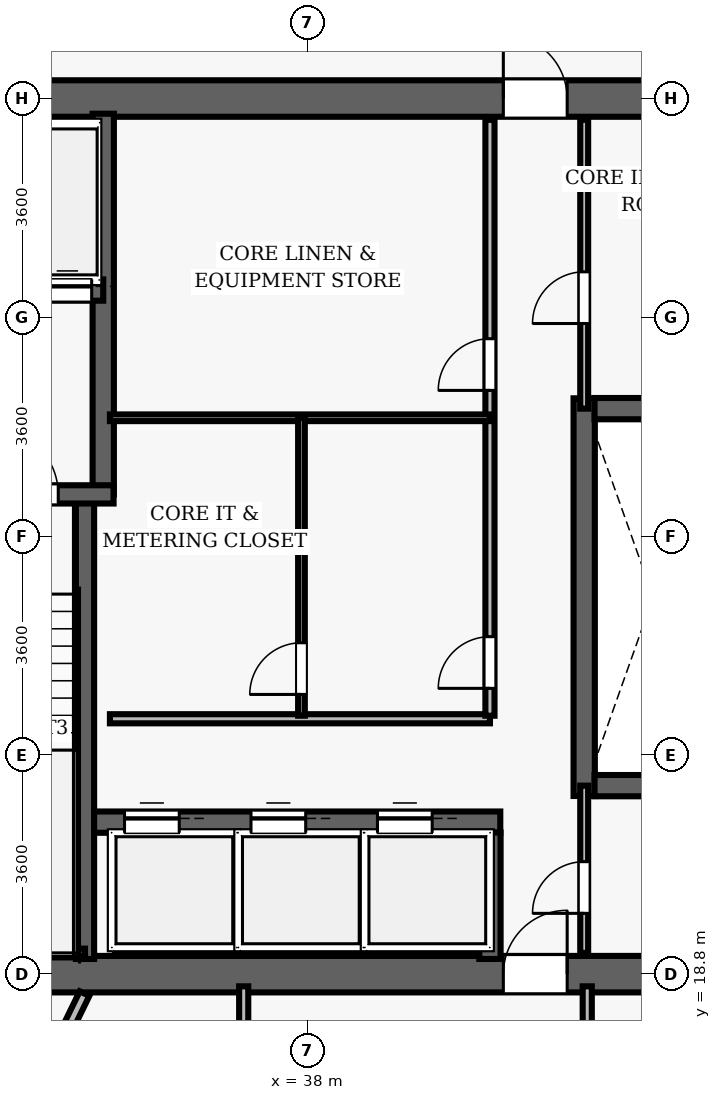
"""IFC4 building model, lengths in metres.
Left out: names, types, materials, properties, quantities, classifications, styles, units other than length and angle.
Written with IfcOpenShell. Run it as: python <this file> out.ifc"""

import sys

from ifc_helpers import new_model, si_unit, direction, frame, frame_2d, origin, place, context, subcontext, project, spatial, rectangle, extrude, element, fill, save


model = new_model("IFC4")
c1 = context("Model", 3, precision=1e-05, world=origin(), true_north=direction((0.0, 1.0)))
c2 = subcontext(c1, "Body", "Model", "MODEL_VIEW")
j1 = project(units=[si_unit("LENGTHUNIT", "METRE"), si_unit("PLANEANGLEUNIT", "RADIAN")], contexts=[c1])
p1 = place(None, origin())
s1 = spatial("IfcSite", under=j1, at=p1, CompositionType="ELEMENT")
p2 = place(p1, origin())
s2 = spatial("IfcBuilding", under=s1, at=p2, CompositionType="ELEMENT")
p3 = place(p2, frame((0.0, 0.0, 148.3)))
s3 = spatial("IfcBuildingStorey", under=s2, at=p3, CompositionType="ELEMENT", Elevation=148.3)
p4 = place(p3, frame((26.7, 18.8, 0.0), z_axis=(0.0, 0.0, 1.0), x_axis=(1.0, 0.0, 0.0)))
e1 = element("IfcWall", 1, at=p4, inside=s3, PredefinedType="SHEAR", context=c2, shape_type="SweptSolid", body=[
    extrude(rectangle(XDim=22.6, YDim=0.6, at=frame_2d((11.3, 0.0))), origin(), (0.0, 0.0, 1.0), 3.5),
])
p5 = place(p4, frame((14.52, 0.0, 0.0)))
e2 = element("IfcOpeningElement", 2, at=p5, cuts=e1, PredefinedType="OPENING", context=c2, shape_type="SweptSolid", body=[
    extrude(rectangle(XDim=1.05, YDim=2.15, at=frame_2d((0.525, 1.075))), frame((0.0, 0.31, 0.0), z_axis=(0.0, -1.0, 0.0), x_axis=(1.0, 0.0, 0.0)), (0.0, 0.0, 1.0), 0.62),
])
p6 = place(p3, frame((26.7, 33.2, 0.0), z_axis=(0.0, 0.0, 1.0), x_axis=(1.0, 0.0, 0.0)))
e3 = element("IfcWall", 3, at=p6, inside=s3, PredefinedType="SHEAR", context=c2, shape_type="SweptSolid", body=[
    extrude(rectangle(XDim=22.6, YDim=0.6, at=frame_2d((11.3, 0.0))), origin(), (0.0, 0.0, 1.0), 3.5),
])
p7 = place(p6, frame((4.62, 0.0, 0.0)))
e4 = element("IfcOpeningElement", 4, at=p7, cuts=e3, PredefinedType="OPENING", context=c2, shape_type="SweptSolid", body=[
    extrude(rectangle(XDim=1.05, YDim=2.15, at=frame_2d((0.525, 1.075))), frame((0.0, 0.31, 0.0), z_axis=(0.0, -1.0, 0.0), x_axis=(1.0, 0.0, 0.0)), (0.0, 0.0, 1.0), 0.62),
])
p8 = place(p6, frame((14.52, 0.0, 0.0)))
e5 = element("IfcOpeningElement", 5, at=p8, cuts=e3, PredefinedType="OPENING", context=c2, shape_type="SweptSolid", body=[
    extrude(rectangle(XDim=1.05, YDim=2.15, at=frame_2d((0.525, 1.075))), frame((0.0, 0.31, 0.0), z_axis=(0.0, -1.0, 0.0), x_axis=(1.0, 0.0, 0.0)), (0.0, 0.0, 1.0), 0.62),
])
p9 = place(p3, frame((34.34, 19.05, 0.0), z_axis=(0.0, 0.0, 1.0), x_axis=(0.0, 1.0, 0.0)))
e6 = element("IfcWall", 6, at=p9, inside=s3, PredefinedType="SHEAR", context=c2, shape_type="SweptSolid", body=[
    extrude(rectangle(XDim=7.5, YDim=0.3, at=frame_2d((3.75, 0.0))), origin(), (0.0, 0.0, 1.0), 3.5),
])
p10 = place(p3, frame((34.64, 26.69, 0.0), z_axis=(0.0, 0.0, 1.0), x_axis=(0.0, 1.0, 0.0)))
e7 = element("IfcWall", 7, at=p10, inside=s3, PredefinedType="SHEAR", context=c2, shape_type="SweptSolid", body=[
    extrude(rectangle(XDim=6.26, YDim=0.35, at=frame_2d((3.13, 0.0))), origin(), (0.0, 0.0, 1.0), 3.5),
])
p11 = place(p3, frame((31.25, 26.69, 0.0), z_axis=(0.0, 0.0, 1.0), x_axis=(1.0, 0.0, 0.0)))
e8 = element("IfcWall", 8, at=p11, inside=s3, PredefinedType="SHEAR", context=c2, shape_type="SweptSolid", body=[
    extrude(rectangle(XDim=3.56, YDim=0.3, at=frame_2d((1.78, 0.0))), origin(), (0.0, 0.0, 1.0), 3.5),
])
p12 = place(p11, frame((1.55, 0.0, 0.0)))
e9 = element("IfcOpeningElement", 9, at=p12, cuts=e8, PredefinedType="OPENING", context=c2, shape_type="SweptSolid", body=[
    extrude(rectangle(XDim=1.1, YDim=2.15, at=frame_2d((0.55, 1.075))), frame((0.0, 0.16, 0.0), z_axis=(0.0, -1.0, 0.0), x_axis=(1.0, 0.0, 0.0)), (0.0, 0.0, 1.0), 0.32),
])
p13 = place(p3, frame((31.3, 19.16, 0.0), z_axis=(0.0, 0.0, 1.0), x_axis=(1.0, 0.0, 0.0)))
e10 = element("IfcWall", 10, at=p13, inside=s3, PredefinedType="SHEAR", context=c2, shape_type="SweptSolid", body=[
    extrude(rectangle(XDim=3.04, YDim=0.12, at=frame_2d((1.52, 0.0))), origin(), (0.0, 0.0, 1.0), 3.5),
])
p14 = place(p3, frame((32.23, 30.05, 0.0), z_axis=(0.0, 0.0, 1.0), x_axis=(1.0, 0.0, 0.0)))
e11 = element("IfcWall", 11, at=p14, inside=s3, PredefinedType="SHEAR", context=c2, shape_type="SweptSolid", body=[
    extrude(rectangle(XDim=2.41, YDim=0.35, at=frame_2d((1.205, 0.0))), origin(), (0.0, 0.0, 1.0), 2.675),
])
p15 = place(p14, frame((0.42, 0.0, 0.0)))
e12 = element("IfcOpeningElement", 12, at=p15, cuts=e11, PredefinedType="OPENING", context=c2, shape_type="SweptSolid", body=[
    extrude(rectangle(XDim=0.8, YDim=2.15, at=frame_2d((0.4, 1.075))), frame((0.0, 0.185, 0.0), z_axis=(0.0, -1.0, 0.0), x_axis=(1.0, 0.0, 0.0)), (0.0, 0.0, 1.0), 0.37),
])
p16 = place(p14, frame((1.42, 0.0, 0.0)))
e13 = element("IfcOpeningElement", 13, at=p16, cuts=e11, PredefinedType="OPENING", context=c2, shape_type="SweptSolid", body=[
    extrude(rectangle(XDim=0.8, YDim=2.15, at=frame_2d((0.4, 1.075))), frame((0.0, 0.185, 0.0), z_axis=(0.0, -1.0, 0.0), x_axis=(1.0, 0.0, 0.0)), (0.0, 0.0, 1.0), 0.37),
])
p17 = place(p3, frame((42.55, 21.73, 0.0), z_axis=(0.0, 0.0, 1.0), x_axis=(0.0, 1.0, 0.0)))
e14 = element("IfcWall", 14, at=p17, inside=s3, PredefinedType="SHEAR", context=c2, shape_type="SweptSolid", body=[
    extrude(rectangle(XDim=6.54, YDim=0.35, at=frame_2d((3.27, 0.0))), origin(), (0.0, 0.0, 1.0), 2.675),
])
for number, where, z_axis, x_axis in (
    (15, (42.72, 21.9, 0.0), (0.0, 0.0, 1.0), (1.0, 0.0, 0.0)),
    (16, (42.72, 28.1, 0.0), (0.0, 0.0, 1.0), (1.0, 0.0, 0.0)),
):
    element("IfcWall", number, at=place(p3, frame(where, z_axis=z_axis, x_axis=x_axis)), inside=s3, PredefinedType="SHEAR", context=c2, shape_type="SweptSolid", body=[
        extrude(rectangle(XDim=2.03, YDim=0.35, at=frame_2d((1.015, 0.0))), origin(), (0.0, 0.0, 1.0), 2.675),
    ])
p18 = place(p3, frame((34.49, 21.3, 0.0), z_axis=(0.0, 0.0, 1.0), x_axis=(1.0, 0.0, 0.0)))
e17 = element("IfcWall", 17, at=p18, inside=s3, PredefinedType="SHEAR", context=c2, shape_type="SweptSolid", body=[
    extrude(rectangle(XDim=6.68, YDim=0.35, at=frame_2d((3.34, 0.0))), origin(), (0.0, 0.0, 1.0), 2.675),
])
p19 = place(p18, frame((0.5, 0.0, 0.0)))
e18 = element("IfcOpeningElement", 18, at=p19, cuts=e17, PredefinedType="OPENING", context=c2, shape_type="SweptSolid", body=[
    extrude(rectangle(XDim=0.9, YDim=2.15, at=frame_2d((0.45, 1.075))), frame((0.0, 0.185, 0.0), z_axis=(0.0, -1.0, 0.0), x_axis=(1.0, 0.0, 0.0)), (0.0, 0.0, 1.0), 0.37),
])
p20 = place(p18, frame((2.58, 0.0, 0.0)))
e19 = element("IfcOpeningElement", 19, at=p20, cuts=e17, PredefinedType="OPENING", context=c2, shape_type="SweptSolid", body=[
    extrude(rectangle(XDim=0.9, YDim=2.15, at=frame_2d((0.45, 1.075))), frame((0.0, 0.185, 0.0), z_axis=(0.0, -1.0, 0.0), x_axis=(1.0, 0.0, 0.0)), (0.0, 0.0, 1.0), 0.37),
])
p21 = place(p18, frame((4.66, 0.0, 0.0)))
e20 = element("IfcOpeningElement", 20, at=p21, cuts=e17, PredefinedType="OPENING", context=c2, shape_type="SweptSolid", body=[
    extrude(rectangle(XDim=0.9, YDim=2.15, at=frame_2d((0.45, 1.075))), frame((0.0, 0.185, 0.0), z_axis=(0.0, -1.0, 0.0), x_axis=(1.0, 0.0, 0.0)), (0.0, 0.0, 1.0), 0.37),
])
p22 = place(p3, frame((41.0, 19.05, 0.0), z_axis=(0.0, 0.0, 1.0), x_axis=(0.0, 1.0, 0.0)))
e21 = element("IfcWall", 21, at=p22, inside=s3, PredefinedType="SHEAR", context=c2, shape_type="SweptSolid", body=[
    extrude(rectangle(XDim=2.08, YDim=0.35, at=frame_2d((1.04, 0.0))), origin(), (0.0, 0.0, 1.0), 2.675),
])
p23 = place(p3, frame((34.75, 23.0, 0.0), z_axis=(0.0, 0.0, 1.0), x_axis=(1.0, 0.0, 0.0)))
e22 = element("IfcWall", 22, at=p23, inside=s3, PredefinedType="PARTITIONING", context=c2, shape_type="SweptSolid", body=[
    extrude(rectangle(XDim=6.25, YDim=0.15, at=frame_2d((3.125, 0.0))), origin(), (0.0, 0.0, 1.0), 2.675),
])
p24 = place(p3, frame((41.0, 23.05, 0.0), z_axis=(0.0, 0.0, 1.0), x_axis=(0.0, 1.0, 0.0)))
e23 = element("IfcWall", 23, at=p24, inside=s3, PredefinedType="PARTITIONING", context=c2, shape_type="SweptSolid", body=[
    extrude(rectangle(XDim=9.8, YDim=0.15, at=frame_2d((4.9, 0.0))), origin(), (0.0, 0.0, 1.0), 2.675),
])
p25 = place(p24, frame((5.35, 0.0, 0.0)))
e24 = element("IfcOpeningElement", 24, at=p25, cuts=e23, PredefinedType="OPENING", context=c2, shape_type="SweptSolid", body=[
    extrude(rectangle(XDim=0.85, YDim=2.1, at=frame_2d((0.425, 1.05))), frame((0.0, 0.085, 0.0), z_axis=(0.0, -1.0, 0.0), x_axis=(1.0, 0.0, 0.0)), (0.0, 0.0, 1.0), 0.17),
])
p26 = place(p24, frame((0.45, 0.0, 0.0)))
e25 = element("IfcOpeningElement", 25, at=p26, cuts=e23, PredefinedType="OPENING", context=c2, shape_type="SweptSolid", body=[
    extrude(rectangle(XDim=0.85, YDim=2.1, at=frame_2d((0.425, 1.05))), frame((0.0, 0.085, 0.0), z_axis=(0.0, -1.0, 0.0), x_axis=(1.0, 0.0, 0.0)), (0.0, 0.0, 1.0), 0.17),
])
p27 = place(p3, frame((34.75, 27.95, 0.0), z_axis=(0.0, 0.0, 1.0), x_axis=(1.0, 0.0, 0.0)))
e26 = element("IfcWall", 26, at=p27, inside=s3, PredefinedType="PARTITIONING", context=c2, shape_type="SweptSolid", body=[
    extrude(rectangle(XDim=6.25, YDim=0.11, at=frame_2d((3.125, 0.0))), origin(), (0.0, 0.0, 1.0), 2.675),
])
p28 = place(p3, frame((37.9, 23.05, 0.0), z_axis=(0.0, 0.0, 1.0), x_axis=(0.0, 1.0, 0.0)))
e27 = element("IfcWall", 27, at=p28, inside=s3, PredefinedType="PARTITIONING", context=c2, shape_type="SweptSolid", body=[
    extrude(rectangle(XDim=4.9, YDim=0.11, at=frame_2d((2.45, 0.0))), origin(), (0.0, 0.0, 1.0), 2.675),
])
p29 = place(p28, frame((0.35, 0.0, 0.0)))
e28 = element("IfcOpeningElement", 28, at=p29, cuts=e27, PredefinedType="OPENING", context=c2, shape_type="SweptSolid", body=[
    extrude(rectangle(XDim=0.85, YDim=2.1, at=frame_2d((0.425, 1.05))), frame((0.0, 0.065, 0.0), z_axis=(0.0, -1.0, 0.0), x_axis=(1.0, 0.0, 0.0)), (0.0, 0.0, 1.0), 0.13),
])
p30 = place(p3, frame((42.55, 28.1, 0.0), z_axis=(0.0, 0.0, 1.0), x_axis=(0.0, 1.0, 0.0)))
e29 = element("IfcWall", 29, at=p30, inside=s3, PredefinedType="PARTITIONING", context=c2, shape_type="SweptSolid", body=[
    extrude(rectangle(XDim=4.75, YDim=0.13, at=frame_2d((2.375, 0.0))), origin(), (0.0, 0.0, 1.0), 2.675),
])
p31 = place(p30, frame((1.4, 0.0, 0.0)))
e30 = element("IfcOpeningElement", 30, at=p31, cuts=e29, PredefinedType="OPENING", context=c2, shape_type="SweptSolid", body=[
    extrude(rectangle(XDim=0.85, YDim=2.1, at=frame_2d((0.425, 1.05))), frame((0.0, 0.075, 0.0), z_axis=(0.0, -1.0, 0.0), x_axis=(1.0, 0.0, 0.0)), (0.0, 0.0, 1.0), 0.15),
])
p32 = place(p3, frame((42.55, 19.15, 0.0), z_axis=(0.0, 0.0, 1.0), x_axis=(0.0, 1.0, 0.0)))
e31 = element("IfcWall", 31, at=p32, inside=s3, PredefinedType="PARTITIONING", context=c2, shape_type="SweptSolid", body=[
    extrude(rectangle(XDim=2.75, YDim=0.13, at=frame_2d((1.375, 0.0))), origin(), (0.0, 0.0, 1.0), 2.675),
])
p33 = place(p32, frame((0.65, 0.0, 0.0)))
e32 = element("IfcOpeningElement", 32, at=p33, cuts=e31, PredefinedType="OPENING", context=c2, shape_type="SweptSolid", body=[
    extrude(rectangle(XDim=0.85, YDim=2.1, at=frame_2d((0.425, 1.05))), frame((0.0, 0.075, 0.0), z_axis=(0.0, -1.0, 0.0), x_axis=(1.0, 0.0, 0.0)), (0.0, 0.0, 1.0), 0.15),
])
p34 = place(p3, frame((36.95, 11.2, 0.0), z_axis=(0.0, 0.0, 1.0), x_axis=(0.0, 1.0, 0.0)))
e33 = element("IfcWall", 33, at=p34, inside=s3, PredefinedType="PARTITIONING", context=c2, shape_type="SweptSolid", body=[
    extrude(rectangle(XDim=7.4, YDim=0.15, at=frame_2d((3.7, 0.0))), origin(), (0.0, 0.0, 1.0), 2.675),
])
p35 = place(p34, frame((5.075, 0.0, 0.0)))
e34 = element("IfcOpeningElement", 34, at=p35, cuts=e33, PredefinedType="OPENING", context=c2, shape_type="SweptSolid", body=[
    extrude(rectangle(XDim=0.95, YDim=2.15, at=frame_2d((0.475, 1.075))), frame((0.0, 0.085, 0.0), z_axis=(0.0, -1.0, 0.0), x_axis=(1.0, 0.0, 0.0)), (0.0, 0.0, 1.0), 0.17),
])
p36 = place(p3, frame((42.6, 16.65, 0.0), z_axis=(0.0, 0.0, 1.0), x_axis=(0.0, 1.0, 0.0)))
e35 = element("IfcWall", 35, at=p36, inside=s3, PredefinedType="PARTITIONING", context=c2, shape_type="SweptSolid", body=[
    extrude(rectangle(XDim=1.95, YDim=0.15, at=frame_2d((0.975, 0.0))), origin(), (0.0, 0.0, 1.0), 2.675),
])
p37 = place(p3, frame((34.332, 18.48, 0.0), z_axis=(0.0, 0.0, 1.0), x_axis=(-0.438373347789, -0.898792972797, 0.0)))
e36 = element("IfcWall", 36, at=p37, inside=s3, PredefinedType="PARTITIONING", context=c2, shape_type="SweptSolid", body=[
    extrude(rectangle(XDim=14.54, YDim=0.175, at=frame_2d((7.27, 0.0))), origin(), (0.0, 0.0, 1.0), 2.675),
])
p38 = place(p12, origin())
e37 = element("IfcDoor", 37, at=p38, inside=s3, OperationType="SINGLE_SWING_LEFT", PredefinedType="DOOR", context=c2, shape_type="SweptSolid", body=[
    extrude(rectangle(XDim=1.1, YDim=2.15, at=frame_2d((0.55, 1.075))), frame((0.0, 0.025, 0.0), z_axis=(0.0, -1.0, 0.0), x_axis=(1.0, 0.0, 0.0)), (0.0, 0.0, 1.0), 0.05),
])
fill(e9, e37)
p39 = place(p8, origin())
e38 = element("IfcDoor", 38, at=p39, inside=s3, OperationType="SINGLE_SWING_LEFT", PredefinedType="DOOR", context=c2, shape_type="SweptSolid", body=[
    extrude(rectangle(XDim=1.05, YDim=2.15, at=frame_2d((0.525, 1.075))), frame((0.0, 0.025, 0.0), z_axis=(0.0, -1.0, 0.0), x_axis=(1.0, 0.0, 0.0)), (0.0, 0.0, 1.0), 0.05),
])
fill(e5, e38)
p40 = place(p5, origin())
e39 = element("IfcDoor", 39, at=p40, inside=s3, OperationType="SINGLE_SWING_RIGHT", PredefinedType="DOOR", context=c2, shape_type="SweptSolid", body=[
    extrude(rectangle(XDim=1.05, YDim=2.15, at=frame_2d((0.525, 1.075))), frame((0.0, 0.025, 0.0), z_axis=(0.0, -1.0, 0.0), x_axis=(1.0, 0.0, 0.0)), (0.0, 0.0, 1.0), 0.05),
])
fill(e2, e39)
p41 = place(p25, origin())
e40 = element("IfcDoor", 40, at=p41, inside=s3, OperationType="SINGLE_SWING_LEFT", PredefinedType="DOOR", context=c2, shape_type="SweptSolid", body=[
    extrude(rectangle(XDim=0.85, YDim=2.1, at=frame_2d((0.425, 1.05))), frame((0.0, 0.025, 0.0), z_axis=(0.0, -1.0, 0.0), x_axis=(1.0, 0.0, 0.0)), (0.0, 0.0, 1.0), 0.05),
])
fill(e24, e40)
p42 = place(p26, origin())
e41 = element("IfcDoor", 41, at=p42, inside=s3, OperationType="SINGLE_SWING_LEFT", PredefinedType="DOOR", context=c2, shape_type="SweptSolid", body=[
    extrude(rectangle(XDim=0.85, YDim=2.1, at=frame_2d((0.425, 1.05))), frame((0.0, 0.025, 0.0), z_axis=(0.0, -1.0, 0.0), x_axis=(1.0, 0.0, 0.0)), (0.0, 0.0, 1.0), 0.05),
])
fill(e25, e41)
p43 = place(p29, origin())
e42 = element("IfcDoor", 42, at=p43, inside=s3, OperationType="SINGLE_SWING_LEFT", PredefinedType="DOOR", context=c2, shape_type="SweptSolid", body=[
    extrude(rectangle(XDim=0.85, YDim=2.1, at=frame_2d((0.425, 1.05))), frame((0.0, 0.025, 0.0), z_axis=(0.0, -1.0, 0.0), x_axis=(1.0, 0.0, 0.0)), (0.0, 0.0, 1.0), 0.05),
])
fill(e28, e42)
p44 = place(p31, origin())
e43 = element("IfcDoor", 43, at=p44, inside=s3, OperationType="SINGLE_SWING_LEFT", PredefinedType="DOOR", context=c2, shape_type="SweptSolid", body=[
    extrude(rectangle(XDim=0.85, YDim=2.1, at=frame_2d((0.425, 1.05))), frame((0.0, 0.025, 0.0), z_axis=(0.0, -1.0, 0.0), x_axis=(1.0, 0.0, 0.0)), (0.0, 0.0, 1.0), 0.05),
])
fill(e30, e43)
p45 = place(p33, origin())
e44 = element("IfcDoor", 44, at=p45, inside=s3, OperationType="SINGLE_SWING_LEFT", PredefinedType="DOOR", context=c2, shape_type="SweptSolid", body=[
    extrude(rectangle(XDim=0.85, YDim=2.1, at=frame_2d((0.425, 1.05))), frame((0.0, 0.025, 0.0), z_axis=(0.0, -1.0, 0.0), x_axis=(1.0, 0.0, 0.0)), (0.0, 0.0, 1.0), 0.05),
])
fill(e32, e44)
p46 = place(p19, origin())
e45 = element("IfcDoor", 45, at=p46, inside=s3, OperationType="SLIDING_TO_LEFT", PredefinedType="DOOR", context=c2, shape_type="SweptSolid", body=[
    extrude(rectangle(XDim=0.9, YDim=2.15, at=frame_2d((0.45, 1.075))), frame((0.0, 0.025, 0.0), z_axis=(0.0, -1.0, 0.0), x_axis=(1.0, 0.0, 0.0)), (0.0, 0.0, 1.0), 0.05),
])
fill(e18, e45)
p47 = place(p20, origin())
e46 = element("IfcDoor", 46, at=p47, inside=s3, OperationType="SLIDING_TO_LEFT", PredefinedType="DOOR", context=c2, shape_type="SweptSolid", body=[
    extrude(rectangle(XDim=0.9, YDim=2.15, at=frame_2d((0.45, 1.075))), frame((0.0, 0.025, 0.0), z_axis=(0.0, -1.0, 0.0), x_axis=(1.0, 0.0, 0.0)), (0.0, 0.0, 1.0), 0.05),
])
fill(e19, e46)
p48 = place(p21, origin())
e47 = element("IfcDoor", 47, at=p48, inside=s3, OperationType="SLIDING_TO_LEFT", PredefinedType="DOOR", context=c2, shape_type="SweptSolid", body=[
    extrude(rectangle(XDim=0.9, YDim=2.15, at=frame_2d((0.45, 1.075))), frame((0.0, 0.025, 0.0), z_axis=(0.0, -1.0, 0.0), x_axis=(1.0, 0.0, 0.0)), (0.0, 0.0, 1.0), 0.05),
])
fill(e20, e47)
p49 = place(p16, origin())
e48 = element("IfcDoor", 48, at=p49, inside=s3, OperationType="SLIDING_TO_LEFT", PredefinedType="DOOR", context=c2, shape_type="SweptSolid", body=[
    extrude(rectangle(XDim=0.8, YDim=2.15, at=frame_2d((0.4, 1.075))), frame((0.0, 0.025, 0.0), z_axis=(0.0, -1.0, 0.0), x_axis=(1.0, 0.0, 0.0)), (0.0, 0.0, 1.0), 0.05),
])
fill(e13, e48)
save(model, sys.argv[1])
